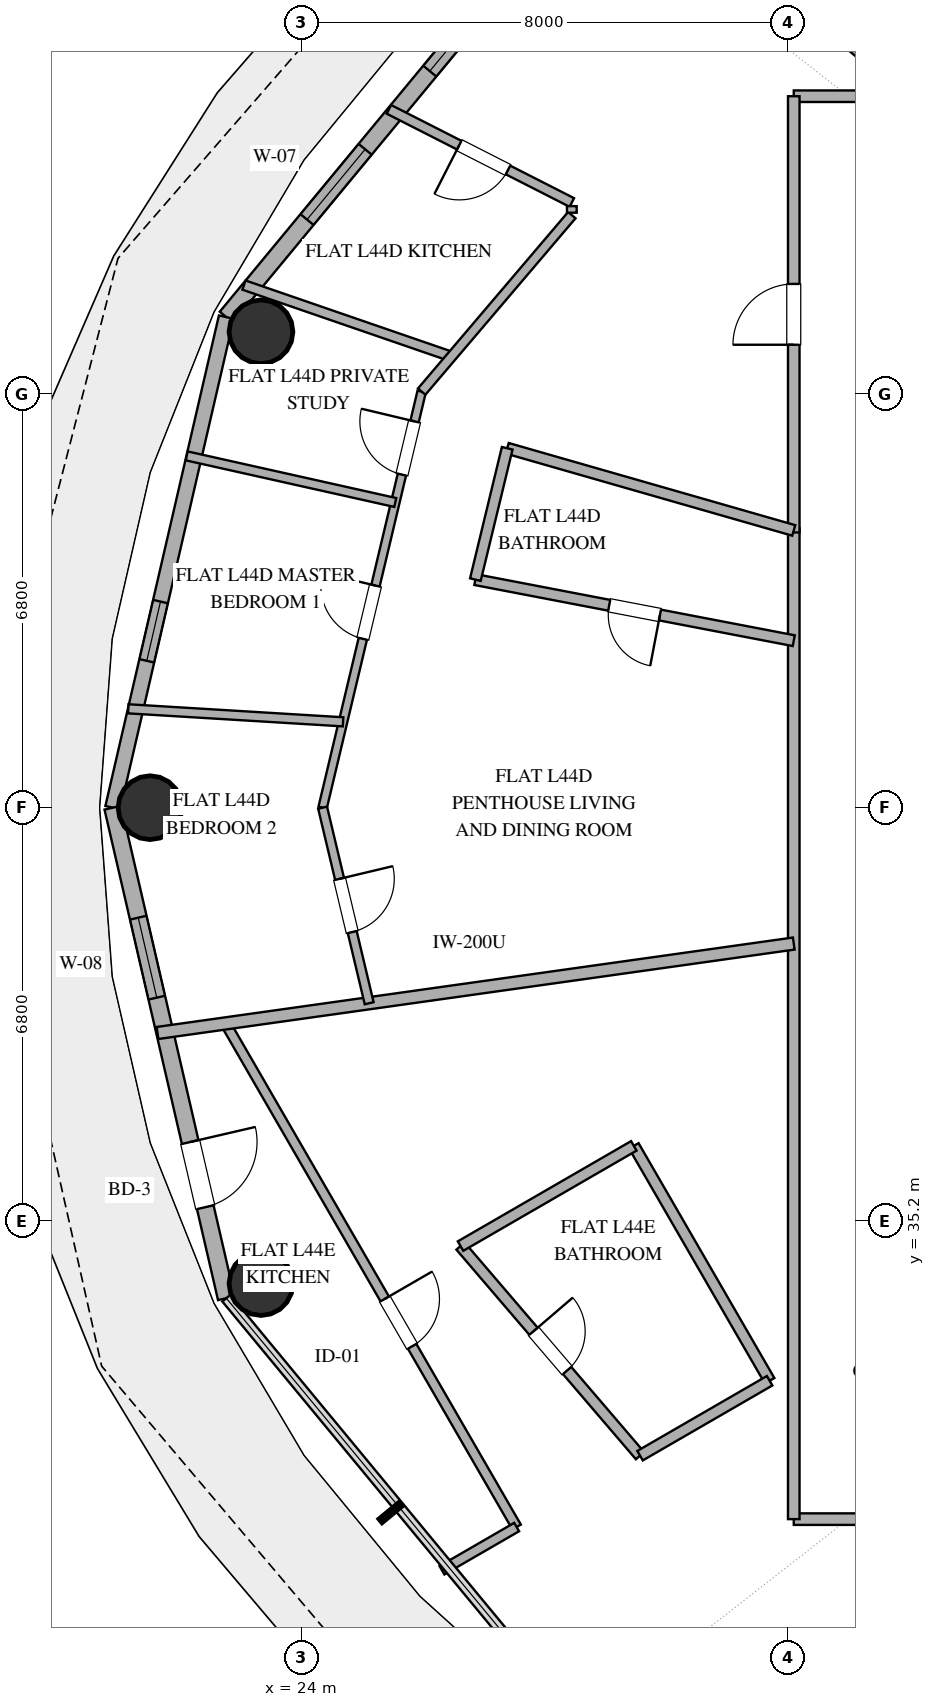
"""IFC4 building model, lengths in metres.
Left out: names, types, materials, properties, quantities, classifications, styles, units other than length and angle.
Written with IfcOpenShell. Run it as: python <this file> out.ifc"""

import sys

from ifc_helpers import new_model, si_unit, direction, frame, frame_2d, origin, origin_2d, place, context, subcontext, project, spatial, rectangle, hollow_circle, extrude, element, fill, save


model = new_model("IFC4")
c1 = context("Model", 3, precision=1e-05, world=origin(), true_north=direction((0.0, 1.0)))
c2 = subcontext(c1, "Body", "Model", "MODEL_VIEW")
j1 = project(units=[si_unit("LENGTHUNIT", "METRE"), si_unit("PLANEANGLEUNIT", "RADIAN")], contexts=[c1])
p1 = place(None, origin())
s1 = spatial("IfcSite", under=j1, at=p1, CompositionType="ELEMENT")
p2 = place(p1, origin())
s2 = spatial("IfcBuilding", under=s1, at=p2, CompositionType="ELEMENT")
p3 = place(p2, frame((0.0, 0.0, 175.8)))
s3 = spatial("IfcBuildingStorey", under=s2, at=p3, CompositionType="ELEMENT", Elevation=175.8)
for number, where, z_axis, x_axis in (
    (1, (23.338, 49.826, 0.0), (0.0, 0.0, 1.0), (1.0, 0.0, 0.0)),
    (2, (21.513, 42.0, 0.0), (0.0, 0.0, 1.0), (1.0, 0.0, 0.0)),
    (3, (23.338, 34.174, 0.0), (0.0, 0.0, 1.0), (1.0, 0.0, 0.0)),
):
    element("IfcColumn", number, at=place(p3, frame(where, z_axis=z_axis, x_axis=x_axis)), inside=s3, PredefinedType="COLUMN", context=c2, shape_type="SweptSolid", body=[
        extrude(hollow_circle(Radius=0.525, WallThickness=0.028, at=origin_2d()), origin(), (0.0, 0.0, 1.0), 3.38),
    ])
p4 = place(p3, frame((28.424, 56.906, 0.0), z_axis=(0.0, 0.0, 1.0), x_axis=(-0.637333477683, -0.770588111915, 0.0)))
e4 = element("IfcWall", 4, at=p4, inside=s3, PredefinedType="SOLIDWALL", context=c2, shape_type="SweptSolid", body=[
    extrude(rectangle(XDim=8.875, YDim=0.28, at=frame_2d((4.438, 0.0))), origin(), (0.0, 0.0, 1.0), 3.38),
])
p5 = place(p4, frame((2.125, 0.0, 0.85)))
e5 = element("IfcOpeningElement", 5, at=p5, cuts=e4, PredefinedType="OPENING", context=c2, shape_type="SweptSolid", body=[
    extrude(rectangle(XDim=1.5, YDim=2.0, at=frame_2d((0.75, 1.0))), frame((0.0, 0.15, 0.0), z_axis=(0.0, -1.0, 0.0), x_axis=(1.0, 0.0, 0.0)), (0.0, 0.0, 1.0), 0.3),
])
p6 = place(p4, frame((5.292, 0.0, 0.85)))
e6 = element("IfcOpeningElement", 6, at=p6, cuts=e4, PredefinedType="OPENING", context=c2, shape_type="SweptSolid", body=[
    extrude(rectangle(XDim=1.5, YDim=1.8, at=frame_2d((0.75, 0.9))), frame((0.0, 0.15, 0.0), z_axis=(0.0, -1.0, 0.0), x_axis=(1.0, 0.0, 0.0)), (0.0, 0.0, 1.0), 0.3),
])
p7 = place(p3, frame((22.768, 50.067, 0.0), z_axis=(0.0, 0.0, 1.0), x_axis=(-0.225473184558, -0.974249374157, 0.0)))
e7 = element("IfcWall", 7, at=p7, inside=s3, PredefinedType="SOLIDWALL", context=c2, shape_type="SweptSolid", body=[
    extrude(rectangle(XDim=8.28, YDim=0.25, at=frame_2d((4.14, 0.0))), origin(), (0.0, 0.0, 1.0), 3.38),
])
p8 = place(p7, frame((4.802, 0.0, 0.35)))
e8 = element("IfcOpeningElement", 8, at=p8, cuts=e7, PredefinedType="OPENING", context=c2, shape_type="SweptSolid", body=[
    extrude(rectangle(XDim=1.0, YDim=1.05, at=frame_2d((0.5, 0.525))), frame((0.0, 0.135, 0.0), z_axis=(0.0, -1.0, 0.0), x_axis=(1.0, 0.0, 0.0)), (0.0, 0.0, 1.0), 0.27),
])
p9 = place(p3, frame((20.901, 42.0, 0.0), z_axis=(0.0, 0.0, 1.0), x_axis=(0.225473184558, -0.974249374157, 0.0)))
e9 = element("IfcWall", 9, at=p9, inside=s3, PredefinedType="SOLIDWALL", context=c2, shape_type="SweptSolid", body=[
    extrude(rectangle(XDim=8.28, YDim=0.28, at=frame_2d((4.14, 0.0))), origin(), (0.0, 0.0, 1.0), 3.38),
])
p10 = place(p9, frame((1.857, 0.0, 0.85)))
e10 = element("IfcOpeningElement", 10, at=p10, cuts=e9, PredefinedType="OPENING", context=c2, shape_type="SweptSolid", body=[
    extrude(rectangle(XDim=1.35, YDim=1.8, at=frame_2d((0.675, 0.9))), frame((0.0, 0.15, 0.0), z_axis=(0.0, -1.0, 0.0), x_axis=(1.0, 0.0, 0.0)), (0.0, 0.0, 1.0), 0.3),
])
p11 = place(p9, frame((5.644, 0.0, 0.0)))
e11 = element("IfcOpeningElement", 11, at=p11, cuts=e9, PredefinedType="OPENING", context=c2, shape_type="SweptSolid", body=[
    extrude(rectangle(XDim=1.1, YDim=2.25, at=frame_2d((0.55, 1.125))), frame((0.0, 0.15, 0.0), z_axis=(0.0, -1.0, 0.0), x_axis=(1.0, 0.0, 0.0)), (0.0, 0.0, 1.0), 0.3),
])
p12 = place(p3, frame((32.1, 53.7, 0.0), z_axis=(0.0, 0.0, 1.0), x_axis=(1.0, 0.0, 0.0)))
e12 = element("IfcWall", 12, at=p12, inside=s3, PredefinedType="PARTITIONING", context=c2, shape_type="SweptSolid", body=[
    extrude(rectangle(XDim=16.061, YDim=0.19, at=frame_2d((8.03, 0.0))), origin(), (0.0, 0.0, 1.0), 2.74),
])
p13 = place(p12, frame((6.907, 0.0, 0.0)))
e13 = element("IfcOpeningElement", 13, at=p13, cuts=e12, PredefinedType="OPENING", context=c2, shape_type="SweptSolid", body=[
    extrude(rectangle(XDim=1.0, YDim=2.2, at=frame_2d((0.5, 1.1))), frame((0.0, 0.105, 0.0), z_axis=(0.0, -1.0, 0.0), x_axis=(1.0, 0.0, 0.0)), (0.0, 0.0, 1.0), 0.21),
])
p14 = place(p3, frame((32.1, 30.3, 0.0), z_axis=(0.0, 0.0, 1.0), x_axis=(1.0, 0.0, 0.0)))
e14 = element("IfcWall", 14, at=p14, inside=s3, PredefinedType="PARTITIONING", context=c2, shape_type="SweptSolid", body=[
    extrude(rectangle(XDim=10.691, YDim=0.19, at=frame_2d((5.345, 0.0))), origin(), (0.0, 0.0, 1.0), 2.74),
])
p15 = place(p14, frame((4.845, 0.0, 0.0)))
e15 = element("IfcOpeningElement", 15, at=p15, cuts=e14, PredefinedType="OPENING", context=c2, shape_type="SweptSolid", body=[
    extrude(rectangle(XDim=1.0, YDim=2.2, at=frame_2d((0.5, 1.1))), frame((0.0, 0.105, 0.0), z_axis=(0.0, -1.0, 0.0), x_axis=(1.0, 0.0, 0.0)), (0.0, 0.0, 1.0), 0.21),
])
p16 = place(p3, frame((22.753, 38.452, 0.0), z_axis=(0.0, 0.0, 1.0), x_axis=(0.500584533727, -0.865687659952, 0.0)))
e16 = element("IfcWall", 16, at=p16, inside=s3, PredefinedType="PLUMBINGWALL", context=c2, shape_type="SweptSolid", body=[
    extrude(rectangle(XDim=9.567, YDim=0.16, at=frame_2d((4.783, 0.0))), origin(), (0.0, 0.0, 1.0), 2.74),
])
p17 = place(p16, frame((5.233, 0.0, 0.0)))
e17 = element("IfcOpeningElement", 17, at=p17, cuts=e16, PredefinedType="OPENING", context=c2, shape_type="SweptSolid", body=[
    extrude(rectangle(XDim=0.9, YDim=2.1, at=frame_2d((0.45, 1.05))), frame((0.0, 0.09, 0.0), z_axis=(0.0, -1.0, 0.0), x_axis=(1.0, 0.0, 0.0)), (0.0, 0.0, 1.0), 0.18),
])
p18 = place(p3, frame((32.1, 46.593, 0.0), z_axis=(0.0, 0.0, 1.0), x_axis=(0.0, -1.0, 0.0)))
e18 = element("IfcWall", 18, at=p18, inside=s3, PredefinedType="PARTITIONING", context=c2, shape_type="SweptSolid", body=[
    extrude(rectangle(XDim=16.292, YDim=0.19, at=frame_2d((8.146, 0.0))), origin(), (0.0, 0.0, 1.0), 2.74),
])
p19 = place(p3, frame((32.1, 46.526, 0.0), z_axis=(0.0, 0.0, 1.0), x_axis=(0.0, 1.0, 0.0)))
e19 = element("IfcWall", 19, at=p19, inside=s3, PredefinedType="PARTITIONING", context=c2, shape_type="SweptSolid", body=[
    extrude(rectangle(XDim=7.174, YDim=0.19, at=frame_2d((3.587, 0.0))), origin(), (0.0, 0.0, 1.0), 2.74),
])
p20 = place(p19, frame((3.087, 0.0, 0.0)))
e20 = element("IfcOpeningElement", 20, at=p20, cuts=e19, PredefinedType="OPENING", context=c2, shape_type="SweptSolid", body=[
    extrude(rectangle(XDim=1.0, YDim=2.2, at=frame_2d((0.5, 1.1))), frame((0.0, 0.105, 0.0), z_axis=(0.0, -1.0, 0.0), x_axis=(1.0, 0.0, 0.0)), (0.0, 0.0, 1.0), 0.21),
])
p21 = place(p3, frame((21.635, 38.295, 0.0), z_axis=(0.0, 0.0, 1.0), x_axis=(0.990268074466, 0.139173060229, 0.0)))
e21 = element("IfcWall", 21, at=p21, inside=s3, PredefinedType="PARTITIONING", context=c2, shape_type="SweptSolid", body=[
    extrude(rectangle(XDim=10.567, YDim=0.2, at=frame_2d((5.284, 0.0))), origin(), (0.0, 0.0, 1.0), 2.74),
])
p22 = place(p3, frame((32.1, 44.746, 0.0), z_axis=(0.0, 0.0, 1.0), x_axis=(-0.982104947805, 0.188334467098, 0.0)))
e22 = element("IfcWall", 22, at=p22, inside=s3, PredefinedType="PLUMBINGWALL", context=c2, shape_type="SweptSolid", body=[
    extrude(rectangle(XDim=5.332, YDim=0.18, at=frame_2d((2.666, 0.0))), origin(), (0.0, 0.0, 1.0), 2.74),
])
p23 = place(p22, frame((2.241, 0.0, 0.0)))
e23 = element("IfcOpeningElement", 23, at=p23, cuts=e22, PredefinedType="OPENING", context=c2, shape_type="SweptSolid", body=[
    extrude(rectangle(XDim=0.85, YDim=2.1, at=frame_2d((0.425, 1.05))), frame((0.0, 0.1, 0.0), z_axis=(0.0, -1.0, 0.0), x_axis=(1.0, 0.0, 0.0)), (0.0, 0.0, 1.0), 0.2),
])
p24 = place(p3, frame((27.387, 47.911, 0.0), z_axis=(0.0, 0.0, 1.0), x_axis=(0.961266088446, -0.27562203686, 0.0)))
e24 = element("IfcWall", 24, at=p24, inside=s3, PredefinedType="PLUMBINGWALL", context=c2, shape_type="SweptSolid", body=[
    extrude(rectangle(XDim=4.903, YDim=0.18, at=frame_2d((2.451, 0.0))), origin(), (0.0, 0.0, 1.0), 2.74),
])
p25 = place(p3, frame((26.62, 34.79, 0.0), z_axis=(0.0, 0.0, 1.0), x_axis=(0.650507788654, -0.759499583213, 0.0)))
e25 = element("IfcWall", 25, at=p25, inside=s3, PredefinedType="PLUMBINGWALL", context=c2, shape_type="SweptSolid", body=[
    extrude(rectangle(XDim=4.538, YDim=0.18, at=frame_2d((2.269, 0.0))), origin(), (0.0, 0.0, 1.0), 2.74),
])
p26 = place(p25, frame((1.844, 0.0, 0.0)))
e26 = element("IfcOpeningElement", 26, at=p26, cuts=e25, PredefinedType="OPENING", context=c2, shape_type="SweptSolid", body=[
    extrude(rectangle(XDim=0.85, YDim=2.1, at=frame_2d((0.425, 1.05))), frame((0.0, 0.1, 0.0), z_axis=(0.0, -1.0, 0.0), x_axis=(1.0, 0.0, 0.0)), (0.0, 0.0, 1.0), 0.2),
])
p27 = place(p3, frame((31.703, 32.576, 0.0), z_axis=(0.0, 0.0, 1.0), x_axis=(-0.500604830324, 0.865675923112, 0.0)))
e27 = element("IfcWall", 27, at=p27, inside=s3, PredefinedType="PLUMBINGWALL", context=c2, shape_type="SweptSolid", body=[
    extrude(rectangle(XDim=4.462, YDim=0.18, at=frame_2d((2.231, 0.0))), origin(), (0.0, 0.0, 1.0), 2.74),
])
p28 = place(p3, frame((24.351, 42.0, 0.0), z_axis=(0.0, 0.0, 1.0), x_axis=(0.231658068135, 0.972797275627, 0.0)))
e28 = element("IfcWall", 28, at=p28, inside=s3, PredefinedType="PARTITIONING", context=c2, shape_type="SweptSolid", body=[
    extrude(rectangle(XDim=7.034, YDim=0.14, at=frame_2d((3.517, 0.0))), origin(), (0.0, 0.0, 1.0), 2.74),
])
p29 = place(p28, frame((2.855, 0.0, 0.0)))
e29 = element("IfcOpeningElement", 29, at=p29, cuts=e28, PredefinedType="OPENING", context=c2, shape_type="SweptSolid", body=[
    extrude(rectangle(XDim=0.9, YDim=2.1, at=frame_2d((0.45, 1.05))), frame((0.0, 0.08, 0.0), z_axis=(0.0, -1.0, 0.0), x_axis=(1.0, 0.0, 0.0)), (0.0, 0.0, 1.0), 0.16),
])
p30 = place(p28, frame((5.63, 0.0, 0.0)))
e30 = element("IfcOpeningElement", 30, at=p30, cuts=e28, PredefinedType="OPENING", context=c2, shape_type="SweptSolid", body=[
    extrude(rectangle(XDim=0.9, YDim=2.1, at=frame_2d((0.45, 1.05))), frame((0.0, 0.08, 0.0), z_axis=(0.0, -1.0, 0.0), x_axis=(1.0, 0.0, 0.0)), (0.0, 0.0, 1.0), 0.16),
])
p31 = place(p3, frame((26.471, 49.418, 0.0), z_axis=(0.0, 0.0, 1.0), x_axis=(-0.945442677411, 0.325788495392, 0.0)))
e31 = element("IfcWall", 31, at=p31, inside=s3, PredefinedType="PLUMBINGWALL", context=c2, shape_type="SweptSolid", body=[
    extrude(rectangle(XDim=3.61, YDim=0.16, at=frame_2d((1.805, 0.0))), origin(), (0.0, 0.0, 1.0), 2.74),
])
p32 = place(p3, frame((21.156, 43.626, 0.0), z_axis=(0.0, 0.0, 1.0), x_axis=(0.998171777701, -0.060440898408, 0.0)))
e32 = element("IfcWall", 32, at=p32, inside=s3, PredefinedType="PARTITIONING", context=c2, shape_type="SweptSolid", body=[
    extrude(rectangle(XDim=3.538, YDim=0.15, at=frame_2d((1.769, 0.0))), origin(), (0.0, 0.0, 1.0), 2.74),
])
p33 = place(p3, frame((25.546, 47.019, 0.0), z_axis=(0.0, 0.0, 1.0), x_axis=(-0.975921546644, 0.218121834754, 0.0)))
e33 = element("IfcWall", 33, at=p33, inside=s3, PredefinedType="PARTITIONING", context=c2, shape_type="SweptSolid", body=[
    extrude(rectangle(XDim=3.515, YDim=0.15, at=frame_2d((1.757, 0.0))), origin(), (0.0, 0.0, 1.0), 2.74),
])
p34 = place(p3, frame((28.45, 51.952, 0.0), z_axis=(0.0, 0.0, 1.0), x_axis=(-0.891148759763, 0.453711238535, 0.0)))
e34 = element("IfcWall", 34, at=p34, inside=s3, PredefinedType="PLUMBINGWALL", context=c2, shape_type="SweptSolid", body=[
    extrude(rectangle(XDim=3.375, YDim=0.16, at=frame_2d((1.688, 0.0))), origin(), (0.0, 0.0, 1.0), 2.74),
])
p35 = place(p34, frame((1.178, 0.0, 0.0)))
e35 = element("IfcOpeningElement", 35, at=p35, cuts=e34, PredefinedType="OPENING", context=c2, shape_type="SweptSolid", body=[
    extrude(rectangle(XDim=0.9, YDim=2.1, at=frame_2d((0.45, 1.05))), frame((0.0, 0.09, 0.0), z_axis=(0.0, -1.0, 0.0), x_axis=(1.0, 0.0, 0.0)), (0.0, 0.0, 1.0), 0.18),
])
p36 = place(p3, frame((24.351, 42.0, 0.0), z_axis=(0.0, 0.0, 1.0), x_axis=(0.231590575549, -0.972813345569, 0.0)))
e36 = element("IfcWall", 36, at=p36, inside=s3, PredefinedType="PARTITIONING", context=c2, shape_type="SweptSolid", body=[
    extrude(rectangle(XDim=3.306, YDim=0.15, at=frame_2d((1.653, 0.0))), origin(), (0.0, 0.0, 1.0), 2.74),
])
p37 = place(p36, frame((1.203, 0.0, 0.0)))
e37 = element("IfcOpeningElement", 37, at=p37, cuts=e36, PredefinedType="OPENING", context=c2, shape_type="SweptSolid", body=[
    extrude(rectangle(XDim=0.9, YDim=2.1, at=frame_2d((0.45, 1.05))), frame((0.0, 0.085, 0.0), z_axis=(0.0, -1.0, 0.0), x_axis=(1.0, 0.0, 0.0)), (0.0, 0.0, 1.0), 0.17),
])
p38 = place(p3, frame((29.469, 36.438, 0.0), z_axis=(0.0, 0.0, 1.0), x_axis=(-0.86566653326, -0.500621067469, 0.0)))
e38 = element("IfcWall", 38, at=p38, inside=s3, PredefinedType="PLUMBINGWALL", context=c2, shape_type="SweptSolid", body=[
    extrude(rectangle(XDim=3.292, YDim=0.18, at=frame_2d((1.646, 0.0))), origin(), (0.0, 0.0, 1.0), 2.74),
])
p39 = place(p3, frame((25.981, 48.842, 0.0), z_axis=(0.0, 0.0, 1.0), x_axis=(0.648022171798, 0.761621470849, 0.0)))
e39 = element("IfcWall", 39, at=p39, inside=s3, PredefinedType="PLUMBINGWALL", context=c2, shape_type="SweptSolid", body=[
    extrude(rectangle(XDim=3.81, YDim=0.16, at=frame_2d((1.905, 0.0))), origin(), (0.0, 0.0, 1.0), 2.74),
])
p40 = place(p3, frame((34.056, 53.7, 0.0), z_axis=(0.0, 0.0, 1.0), x_axis=(-0.766037176398, 0.642796269728, 0.0)))
e40 = element("IfcWall", 40, at=p40, inside=s3, PredefinedType="PARTITIONING", context=c2, shape_type="SweptSolid", body=[
    extrude(rectangle(XDim=6.004, YDim=0.2, at=frame_2d((3.002, 0.0))), origin(), (0.0, 0.0, 1.0), 2.74),
])
p41 = place(p3, frame((29.572, 31.344, 0.0), z_axis=(0.0, 0.0, 1.0), x_axis=(0.865711329059, 0.500543599239, 0.0)))
e41 = element("IfcWall", 41, at=p41, inside=s3, PredefinedType="PLUMBINGWALL", context=c2, shape_type="SweptSolid", body=[
    extrude(rectangle(XDim=2.462, YDim=0.18, at=frame_2d((1.231, 0.0))), origin(), (0.0, 0.0, 1.0), 2.74),
])
p42 = place(p3, frame((26.864, 45.75, 0.0), z_axis=(0.0, 0.0, 1.0), x_axis=(0.235499423966, 0.971874488456, 0.0)))
e42 = element("IfcWall", 42, at=p42, inside=s3, PredefinedType="PLUMBINGWALL", context=c2, shape_type="SweptSolid", body=[
    extrude(rectangle(XDim=2.223, YDim=0.18, at=frame_2d((1.111, 0.0))), origin(), (0.0, 0.0, 1.0), 2.74),
])
p43 = place(p3, frame((27.542, 30.17, 0.0), z_axis=(0.0, 0.0, 1.0), x_axis=(-0.865626475351, -0.500690328617, 0.0)))
e43 = element("IfcWall", 43, at=p43, inside=s3, PredefinedType="PLUMBINGWALL", context=c2, shape_type="SweptSolid", body=[
    extrude(rectangle(XDim=1.419, YDim=0.16, at=frame_2d((0.709, 0.0))), origin(), (0.0, 0.0, 1.0), 2.74),
])
p44 = place(p3, frame((28.45, 51.784, 0.0), z_axis=(0.0, 0.0, 1.0), x_axis=(0.0, 1.0, 0.0)))
e44 = element("IfcWall", 44, at=p44, inside=s3, PredefinedType="PLUMBINGWALL", context=c2, shape_type="SweptSolid", body=[
    extrude(rectangle(XDim=0.108, YDim=0.16, at=frame_2d((0.054, 0.0))), origin(), (0.0, 0.0, 1.0), 2.74),
])
p45 = place(p5, origin())
e45 = element("IfcWindow", 45, at=p45, inside=s3, PartitioningType="SINGLE_PANEL", PredefinedType="WINDOW", context=c2, shape_type="SweptSolid", body=[
    extrude(rectangle(XDim=1.5, YDim=2.0, at=frame_2d((0.75, 1.0))), frame((0.0, 0.03, 0.0), z_axis=(0.0, -1.0, 0.0), x_axis=(1.0, 0.0, 0.0)), (0.0, 0.0, 1.0), 0.06),
])
fill(e5, e45)
p46 = place(p6, origin())
e46 = element("IfcWindow", 46, at=p46, inside=s3, PartitioningType="SINGLE_PANEL", PredefinedType="WINDOW", context=c2, shape_type="SweptSolid", body=[
    extrude(rectangle(XDim=1.5, YDim=1.8, at=frame_2d((0.75, 0.9))), frame((0.0, 0.03, 0.0), z_axis=(0.0, -1.0, 0.0), x_axis=(1.0, 0.0, 0.0)), (0.0, 0.0, 1.0), 0.06),
])
fill(e6, e46)
p47 = place(p10, origin())
e47 = element("IfcWindow", 47, at=p47, inside=s3, PartitioningType="SINGLE_PANEL", PredefinedType="WINDOW", context=c2, shape_type="SweptSolid", body=[
    extrude(rectangle(XDim=1.35, YDim=1.8, at=frame_2d((0.675, 0.9))), frame((0.0, 0.03, 0.0), z_axis=(0.0, -1.0, 0.0), x_axis=(1.0, 0.0, 0.0)), (0.0, 0.0, 1.0), 0.06),
])
fill(e10, e47)
p48 = place(p11, origin())
e48 = element("IfcDoor", 48, at=p48, inside=s3, OperationType="SINGLE_SWING_LEFT", PredefinedType="DOOR", context=c2, shape_type="SweptSolid", body=[
    extrude(rectangle(XDim=1.1, YDim=2.25, at=frame_2d((0.55, 1.125))), frame((0.0, 0.025, 0.0), z_axis=(0.0, -1.0, 0.0), x_axis=(1.0, 0.0, 0.0)), (0.0, 0.0, 1.0), 0.05),
])
fill(e11, e48)
p49 = place(p8, origin())
e49 = element("IfcWindow", 49, at=p49, inside=s3, PartitioningType="SINGLE_PANEL", PredefinedType="WINDOW", context=c2, shape_type="SweptSolid", body=[
    extrude(rectangle(XDim=1.0, YDim=1.05, at=frame_2d((0.5, 0.525))), frame((0.0, 0.03, 0.0), z_axis=(0.0, -1.0, 0.0), x_axis=(1.0, 0.0, 0.0)), (0.0, 0.0, 1.0), 0.06),
])
fill(e8, e49)
p50 = place(p17, origin())
e50 = element("IfcDoor", 50, at=p50, inside=s3, OperationType="SINGLE_SWING_LEFT", PredefinedType="DOOR", context=c2, shape_type="SweptSolid", body=[
    extrude(rectangle(XDim=0.9, YDim=2.1, at=frame_2d((0.45, 1.05))), frame((0.0, 0.025, 0.0), z_axis=(0.0, -1.0, 0.0), x_axis=(1.0, 0.0, 0.0)), (0.0, 0.0, 1.0), 0.05),
])
fill(e17, e50)
p51 = place(p20, origin())
e51 = element("IfcDoor", 51, at=p51, inside=s3, OperationType="SINGLE_SWING_LEFT", PredefinedType="DOOR", context=c2, shape_type="SweptSolid", body=[
    extrude(rectangle(XDim=1.0, YDim=2.2, at=frame_2d((0.5, 1.1))), frame((0.0, 0.025, 0.0), z_axis=(0.0, -1.0, 0.0), x_axis=(1.0, 0.0, 0.0)), (0.0, 0.0, 1.0), 0.05),
])
fill(e20, e51)
p52 = place(p23, origin())
e52 = element("IfcDoor", 52, at=p52, inside=s3, OperationType="SINGLE_SWING_LEFT", PredefinedType="DOOR", context=c2, shape_type="SweptSolid", body=[
    extrude(rectangle(XDim=0.85, YDim=2.1, at=frame_2d((0.425, 1.05))), frame((0.0, 0.025, 0.0), z_axis=(0.0, -1.0, 0.0), x_axis=(1.0, 0.0, 0.0)), (0.0, 0.0, 1.0), 0.05),
])
fill(e23, e52)
p53 = place(p26, origin())
e53 = element("IfcDoor", 53, at=p53, inside=s3, OperationType="SINGLE_SWING_LEFT", PredefinedType="DOOR", context=c2, shape_type="SweptSolid", body=[
    extrude(rectangle(XDim=0.85, YDim=2.1, at=frame_2d((0.425, 1.05))), frame((0.0, 0.025, 0.0), z_axis=(0.0, -1.0, 0.0), x_axis=(1.0, 0.0, 0.0)), (0.0, 0.0, 1.0), 0.05),
])
fill(e26, e53)
p54 = place(p29, origin())
e54 = element("IfcDoor", 54, at=p54, inside=s3, OperationType="SINGLE_SWING_RIGHT", PredefinedType="DOOR", context=c2, shape_type="SweptSolid", body=[
    extrude(rectangle(XDim=0.9, YDim=2.1, at=frame_2d((0.45, 1.05))), frame((0.0, 0.025, 0.0), z_axis=(0.0, -1.0, 0.0), x_axis=(1.0, 0.0, 0.0)), (0.0, 0.0, 1.0), 0.05),
])
fill(e29, e54)
p55 = place(p30, origin())
e55 = element("IfcDoor", 55, at=p55, inside=s3, OperationType="SINGLE_SWING_RIGHT", PredefinedType="DOOR", context=c2, shape_type="SweptSolid", body=[
    extrude(rectangle(XDim=0.9, YDim=2.1, at=frame_2d((0.45, 1.05))), frame((0.0, 0.025, 0.0), z_axis=(0.0, -1.0, 0.0), x_axis=(1.0, 0.0, 0.0)), (0.0, 0.0, 1.0), 0.05),
])
fill(e30, e55)
p56 = place(p35, origin())
e56 = element("IfcDoor", 56, at=p56, inside=s3, OperationType="SINGLE_SWING_RIGHT", PredefinedType="DOOR", context=c2, shape_type="SweptSolid", body=[
    extrude(rectangle(XDim=0.9, YDim=2.1, at=frame_2d((0.45, 1.05))), frame((0.0, 0.025, 0.0), z_axis=(0.0, -1.0, 0.0), x_axis=(1.0, 0.0, 0.0)), (0.0, 0.0, 1.0), 0.05),
])
fill(e35, e56)
p57 = place(p37, origin())
e57 = element("IfcDoor", 57, at=p57, inside=s3, OperationType="SINGLE_SWING_LEFT", PredefinedType="DOOR", context=c2, shape_type="SweptSolid", body=[
    extrude(rectangle(XDim=0.9, YDim=2.1, at=frame_2d((0.45, 1.05))), frame((0.0, 0.025, 0.0), z_axis=(0.0, -1.0, 0.0), x_axis=(1.0, 0.0, 0.0)), (0.0, 0.0, 1.0), 0.05),
])
fill(e37, e57)
save(model, sys.argv[1])
